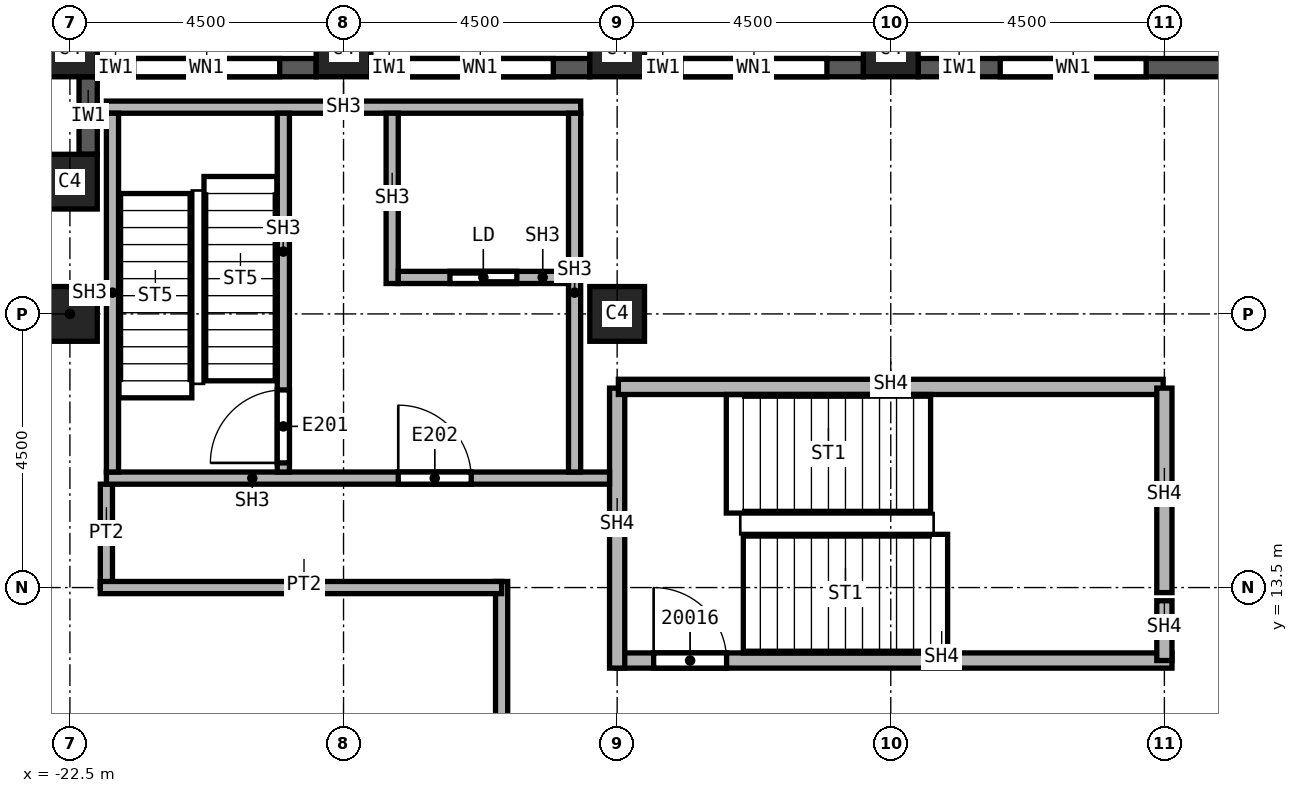
"""IFC4 building model, lengths in metres.
Left out: names, types, materials, properties, quantities, classifications, styles, units other than length and angle.
Written with IfcOpenShell. Run it as: python <this file> out.ifc"""

import sys

from ifc_helpers import new_model, si_unit, direction, frame, frame_2d, origin, origin_2d, place, context, subcontext, project, spatial, rectangle, extrude, element, fill, save


model = new_model("IFC4")
c1 = context("Model", 3, precision=1e-05, world=origin(), true_north=direction((0.0, 1.0)))
c2 = subcontext(c1, "Body", "Model", "MODEL_VIEW")
j1 = project(units=[si_unit("LENGTHUNIT", "METRE"), si_unit("PLANEANGLEUNIT", "RADIAN")], contexts=[c1])
p1 = place(None, origin())
s1 = spatial("IfcSite", under=j1, at=p1, CompositionType="ELEMENT")
p2 = place(p1, origin())
s2 = spatial("IfcBuilding", under=s1, at=p2, CompositionType="ELEMENT")
p3 = place(p2, frame((0.0, 0.0, 290.0)))
s3 = spatial("IfcBuildingStorey", under=s2, at=p3, CompositionType="ELEMENT", Elevation=290.0)
for number, where, z_axis, x_axis in (
    (1, (-13.5, 18.0, 0.0), (0.0, 0.0, 1.0), (1.0, 0.0, 0.0)),
    (2, (-22.5, 18.0, 0.0), (0.0, 0.0, 1.0), (1.0, 0.0, 0.0)),
    (3, (-9.0, 22.35, 0.0), (0.0, 0.0, 1.0), (1.0, 0.0, 0.0)),
    (4, (-13.5, 22.35, 0.0), (0.0, 0.0, 1.0), (1.0, 0.0, 0.0)),
    (5, (-18.0, 22.35, 0.0), (0.0, 0.0, 1.0), (1.0, 0.0, 0.0)),
    (6, (-22.5, 22.35, 0.0), (0.0, 0.0, 1.0), (1.0, 0.0, 0.0)),
    (7, (-22.5, 20.175, 0.0), (0.0, 0.0, 1.0), (1.0, 0.0, 0.0)),
):
    element("IfcColumn", number, at=place(p3, frame(where, z_axis=z_axis, x_axis=x_axis)), inside=s3, PredefinedType="COLUMN", context=c2, shape_type="SweptSolid", body=[
        extrude(rectangle(XDim=0.9, YDim=0.9, at=origin_2d()), origin(), (0.0, 0.0, 1.0), 3.59),
    ])
p4 = place(p3, frame((-3.45, 22.05, 0.0), z_axis=(0.0, 0.0, 1.0), x_axis=(-1.0, 0.0, 0.0)))
e8 = element("IfcWall", 8, at=p4, inside=s3, PredefinedType="SOLIDWALL", context=c2, shape_type="SweptSolid", body=[
    extrude(rectangle(XDim=5.1, YDim=0.3, at=frame_2d((2.55, 0.0))), origin(), (0.0, 0.0, 1.0), 2.99),
])
p5 = place(p4, frame((1.35, 0.0, 0.8)))
e9 = element("IfcOpeningElement", 9, at=p5, cuts=e8, PredefinedType="OPENING", context=c2, shape_type="SweptSolid", body=[
    extrude(rectangle(XDim=2.4, YDim=1.95, at=frame_2d((1.2, 0.975))), frame((0.0, 0.15, 0.0), z_axis=(0.0, -1.0, 0.0), x_axis=(1.0, 0.0, 0.0)), (0.0, 0.0, 1.0), 0.3),
])
p6 = place(p3, frame((-9.45, 22.05, 0.0), z_axis=(0.0, 0.0, 1.0), x_axis=(-1.0, 0.0, 0.0)))
e10 = element("IfcWall", 10, at=p6, inside=s3, PredefinedType="SOLIDWALL", context=c2, shape_type="SweptSolid", body=[
    extrude(rectangle(XDim=3.6, YDim=0.3, at=frame_2d((1.8, 0.0))), origin(), (0.0, 0.0, 1.0), 2.99),
])
p7 = place(p6, frame((0.6, 0.0, 0.8)))
e11 = element("IfcOpeningElement", 11, at=p7, cuts=e10, PredefinedType="OPENING", context=c2, shape_type="SweptSolid", body=[
    extrude(rectangle(XDim=2.4, YDim=1.95, at=frame_2d((1.2, 0.975))), frame((0.0, 0.15, 0.0), z_axis=(0.0, -1.0, 0.0), x_axis=(1.0, 0.0, 0.0)), (0.0, 0.0, 1.0), 0.3),
])
p8 = place(p3, frame((-13.95, 22.05, 0.0), z_axis=(0.0, 0.0, 1.0), x_axis=(-1.0, 0.0, 0.0)))
e12 = element("IfcWall", 12, at=p8, inside=s3, PredefinedType="SOLIDWALL", context=c2, shape_type="SweptSolid", body=[
    extrude(rectangle(XDim=3.6, YDim=0.3, at=frame_2d((1.8, 0.0))), origin(), (0.0, 0.0, 1.0), 2.99),
])
p9 = place(p8, frame((0.6, 0.0, 0.8)))
e13 = element("IfcOpeningElement", 13, at=p9, cuts=e12, PredefinedType="OPENING", context=c2, shape_type="SweptSolid", body=[
    extrude(rectangle(XDim=2.4, YDim=1.95, at=frame_2d((1.2, 0.975))), frame((0.0, 0.15, 0.0), z_axis=(0.0, -1.0, 0.0), x_axis=(1.0, 0.0, 0.0)), (0.0, 0.0, 1.0), 0.3),
])
p10 = place(p3, frame((-18.45, 22.05, 0.0), z_axis=(0.0, 0.0, 1.0), x_axis=(-1.0, 0.0, 0.0)))
e14 = element("IfcWall", 14, at=p10, inside=s3, PredefinedType="SOLIDWALL", context=c2, shape_type="SweptSolid", body=[
    extrude(rectangle(XDim=3.6, YDim=0.3, at=frame_2d((1.8, 0.0))), origin(), (0.0, 0.0, 1.0), 2.99),
])
p11 = place(p10, frame((0.6, 0.0, 0.8)))
e15 = element("IfcOpeningElement", 15, at=p11, cuts=e14, PredefinedType="OPENING", context=c2, shape_type="SweptSolid", body=[
    extrude(rectangle(XDim=2.4, YDim=1.95, at=frame_2d((1.2, 0.975))), frame((0.0, 0.15, 0.0), z_axis=(0.0, -1.0, 0.0), x_axis=(1.0, 0.0, 0.0)), (0.0, 0.0, 1.0), 0.3),
])
p12 = place(p3, frame((-22.2, 21.9, 0.0), z_axis=(0.0, 0.0, 1.0), x_axis=(0.0, -1.0, 0.0)))
e16 = element("IfcWall", 16, at=p12, inside=s3, PredefinedType="SOLIDWALL", context=c2, shape_type="SweptSolid", body=[
    extrude(rectangle(XDim=1.275, YDim=0.3, at=frame_2d((0.637, 0.0))), origin(), (0.0, 0.0, 1.0), 2.99),
])
p13 = place(p3, frame((-21.9, 13.5, 0.0), z_axis=(0.0, 0.0, 1.0), x_axis=(0.0, 1.0, 0.0)))
e17 = element("IfcWall", 17, at=p13, inside=s3, PredefinedType="PARTITIONING", context=c2, shape_type="SweptSolid", body=[
    extrude(rectangle(XDim=1.7, YDim=0.2, at=frame_2d((0.85, 0.0))), origin(), (0.0, 0.0, 1.0), 3.59),
])
p14 = place(p3, frame((-15.4, -21.9, 0.0), z_axis=(0.0, 0.0, 1.0), x_axis=(0.0, 1.0, 0.0)))
e18 = element("IfcWall", 18, at=p14, inside=s3, PredefinedType="PARTITIONING", context=c2, shape_type="SweptSolid", body=[
    extrude(rectangle(XDim=35.5, YDim=0.2, at=frame_2d((17.75, 0.0))), origin(), (0.0, 0.0, 1.0), 3.59),
])
p15 = place(p14, frame((30.9, 0.0, 0.0)))
e19 = element("IfcOpeningElement", 19, at=p15, cuts=e18, PredefinedType="OPENING", context=c2, shape_type="SweptSolid", body=[
    extrude(rectangle(XDim=1.0, YDim=2.1, at=frame_2d((0.5, 1.05))), frame((0.0, 0.1, 0.0), z_axis=(0.0, -1.0, 0.0), x_axis=(1.0, 0.0, 0.0)), (0.0, 0.0, 1.0), 0.2),
])
p16 = place(p14, frame((2.65, 0.0, 0.0)))
e20 = element("IfcOpeningElement", 20, at=p16, cuts=e18, PredefinedType="OPENING", context=c2, shape_type="SweptSolid", body=[
    extrude(rectangle(XDim=1.0, YDim=2.1, at=frame_2d((0.5, 1.05))), frame((0.0, 0.1, 0.0), z_axis=(0.0, -1.0, 0.0), x_axis=(1.0, 0.0, 0.0)), (0.0, 0.0, 1.0), 0.2),
])
p17 = place(p14, frame((7.65, 0.0, 0.0)))
e21 = element("IfcOpeningElement", 21, at=p17, cuts=e18, PredefinedType="OPENING", context=c2, shape_type="SweptSolid", body=[
    extrude(rectangle(XDim=1.0, YDim=2.1, at=frame_2d((0.5, 1.05))), frame((0.0, 0.1, 0.0), z_axis=(0.0, -1.0, 0.0), x_axis=(1.0, 0.0, 0.0)), (0.0, 0.0, 1.0), 0.2),
])
p18 = place(p14, frame((14.7, 0.0, 0.0)))
e22 = element("IfcOpeningElement", 22, at=p18, cuts=e18, PredefinedType="OPENING", context=c2, shape_type="SweptSolid", body=[
    extrude(rectangle(XDim=1.0, YDim=2.1, at=frame_2d((0.5, 1.05))), frame((0.0, 0.1, 0.0), z_axis=(0.0, -1.0, 0.0), x_axis=(1.0, 0.0, 0.0)), (0.0, 0.0, 1.0), 0.2),
])
p19 = place(p14, frame((18.3, 0.0, 0.0)))
e23 = element("IfcOpeningElement", 23, at=p19, cuts=e18, PredefinedType="OPENING", context=c2, shape_type="SweptSolid", body=[
    extrude(rectangle(XDim=1.0, YDim=2.1, at=frame_2d((0.5, 1.05))), frame((0.0, 0.1, 0.0), z_axis=(0.0, -1.0, 0.0), x_axis=(1.0, 0.0, 0.0)), (0.0, 0.0, 1.0), 0.2),
])
p20 = place(p3, frame((-15.4, 13.5, 0.0), z_axis=(0.0, 0.0, 1.0), x_axis=(-1.0, 0.0, 0.0)))
e24 = element("IfcWall", 24, at=p20, inside=s3, PredefinedType="PARTITIONING", context=c2, shape_type="SweptSolid", body=[
    extrude(rectangle(XDim=6.6, YDim=0.2, at=frame_2d((3.3, 0.0))), origin(), (0.0, 0.0, 1.0), 3.59),
])
p21 = place(p3, frame((-13.5, 12.3, 0.0), z_axis=(0.0, 0.0, 1.0), x_axis=(1.0, 0.0, 0.0)))
e25 = element("IfcWall", 25, at=p21, inside=s3, PredefinedType="SOLIDWALL", context=c2, shape_type="SweptSolid", body=[
    extrude(rectangle(XDim=9.125, YDim=0.25, at=frame_2d((4.562, 0.0))), origin(), (0.0, 0.0, 1.0), 3.59),
])
p22 = place(p21, frame((0.6, 0.0, 0.0)))
e26 = element("IfcOpeningElement", 26, at=p22, cuts=e25, PredefinedType="OPENING", context=c2, shape_type="SweptSolid", body=[
    extrude(rectangle(XDim=1.2, YDim=2.1, at=frame_2d((0.6, 1.05))), frame((0.0, 0.125, 0.0), z_axis=(0.0, -1.0, 0.0), x_axis=(1.0, 0.0, 0.0)), (0.0, 0.0, 1.0), 0.25),
])
p23 = place(p3, frame((-13.5, 16.78, 0.0), z_axis=(0.0, 0.0, 1.0), x_axis=(0.0, -1.0, 0.0)))
e27 = element("IfcWall", 27, at=p23, inside=s3, PredefinedType="SOLIDWALL", context=c2, shape_type="SweptSolid", body=[
    extrude(rectangle(XDim=4.605, YDim=0.25, at=frame_2d((2.302, 0.0))), origin(), (0.0, 0.0, 1.0), 3.59),
])
p24 = place(p3, frame((-13.48, 16.8, 0.0), z_axis=(0.0, 0.0, 1.0), x_axis=(1.0, 0.0, 0.0)))
e28 = element("IfcWall", 28, at=p24, inside=s3, PredefinedType="SOLIDWALL", context=c2, shape_type="SweptSolid", body=[
    extrude(rectangle(XDim=8.96, YDim=0.25, at=frame_2d((4.48, 0.0))), origin(), (0.0, 0.0, 1.0), 3.59),
])
p25 = place(p3, frame((-4.5, 13.283, 0.0), z_axis=(0.0, 0.0, 1.0), x_axis=(0.0, -1.0, 0.0)))
e29 = element("IfcWall", 29, at=p25, inside=s3, PredefinedType="SOLIDWALL", context=c2, shape_type="SweptSolid", body=[
    extrude(rectangle(XDim=0.983, YDim=0.25, at=frame_2d((0.491, 0.0))), origin(), (0.0, 0.0, 1.0), 3.59),
])
p26 = place(p3, frame((-4.5, 16.78, 0.0), z_axis=(0.0, 0.0, 1.0), x_axis=(0.0, -1.0, 0.0)))
e30 = element("IfcWall", 30, at=p26, inside=s3, PredefinedType="SOLIDWALL", context=c2, shape_type="SweptSolid", body=[
    extrude(rectangle(XDim=3.363, YDim=0.25, at=frame_2d((1.682, 0.0))), origin(), (0.0, 0.0, 1.0), 3.59),
])
p27 = place(p3, frame((-21.9, 15.3, 0.0), z_axis=(0.0, 0.0, 1.0), x_axis=(1.0, 0.0, 0.0)))
e31 = element("IfcWall", 31, at=p27, inside=s3, PredefinedType="SOLIDWALL", context=c2, shape_type="SweptSolid", body=[
    extrude(rectangle(XDim=8.275, YDim=0.2, at=frame_2d((4.137, 0.0))), origin(), (0.0, 0.0, 1.0), 3.59),
])
p28 = place(p27, frame((4.8, 0.0, 0.0)))
e32 = element("IfcOpeningElement", 32, at=p28, cuts=e31, PredefinedType="OPENING", context=c2, shape_type="SweptSolid", body=[
    extrude(rectangle(XDim=1.2, YDim=2.1, at=frame_2d((0.6, 1.05))), frame((0.0, 0.1, 0.0), z_axis=(0.0, -1.0, 0.0), x_axis=(1.0, 0.0, 0.0)), (0.0, 0.0, 1.0), 0.2),
])
p29 = place(p3, frame((-21.9, 21.4, 0.0), z_axis=(0.0, 0.0, 1.0), x_axis=(1.0, 0.0, 0.0)))
e33 = element("IfcWall", 33, at=p29, inside=s3, PredefinedType="SOLIDWALL", context=c2, shape_type="SweptSolid", body=[
    extrude(rectangle(XDim=7.8, YDim=0.2, at=frame_2d((3.9, 0.0))), origin(), (0.0, 0.0, 1.0), 3.59),
])
for number, where, z_axis, x_axis in (
    (34, (-21.8, 15.4, 0.0), (0.0, 0.0, 1.0), (0.0, 1.0, 0.0)),
    (35, (-14.2, 15.4, 0.0), (0.0, 0.0, 1.0), (0.0, 1.0, 0.0)),
):
    element("IfcWall", number, at=place(p3, frame(where, z_axis=z_axis, x_axis=x_axis)), inside=s3, PredefinedType="SOLIDWALL", context=c2, shape_type="SweptSolid", body=[
        extrude(rectangle(XDim=5.9, YDim=0.2, at=frame_2d((2.95, 0.0))), origin(), (0.0, 0.0, 1.0), 3.59),
    ])
p30 = place(p3, frame((-18.99, 15.4, 0.0), z_axis=(0.0, 0.0, 1.0), x_axis=(0.0, 1.0, 0.0)))
e36 = element("IfcWall", 36, at=p30, inside=s3, PredefinedType="SOLIDWALL", context=c2, shape_type="SweptSolid", body=[
    extrude(rectangle(XDim=5.9, YDim=0.2, at=frame_2d((2.95, 0.0))), origin(), (0.0, 0.0, 1.0), 3.59),
])
p31 = place(p30, frame((0.15, 0.0, 0.0)))
e37 = element("IfcOpeningElement", 37, at=p31, cuts=e36, PredefinedType="OPENING", context=c2, shape_type="SweptSolid", body=[
    extrude(rectangle(XDim=1.2, YDim=2.1, at=frame_2d((0.6, 1.05))), frame((0.0, 0.1, 0.0), z_axis=(0.0, -1.0, 0.0), x_axis=(1.0, 0.0, 0.0)), (0.0, 0.0, 1.0), 0.2),
])
p32 = place(p3, frame((-17.2, 18.5, 0.0), z_axis=(0.0, 0.0, 1.0), x_axis=(0.0, 1.0, 0.0)))
e38 = element("IfcWall", 38, at=p32, inside=s3, PredefinedType="SOLIDWALL", context=c2, shape_type="SweptSolid", body=[
    extrude(rectangle(XDim=2.8, YDim=0.2, at=frame_2d((1.4, 0.0))), origin(), (0.0, 0.0, 1.0), 3.59),
])
p33 = place(p3, frame((-17.1, 18.6, 0.0), z_axis=(0.0, 0.0, 1.0), x_axis=(1.0, 0.0, 0.0)))
e39 = element("IfcWall", 39, at=p33, inside=s3, PredefinedType="SOLIDWALL", context=c2, shape_type="SweptSolid", body=[
    extrude(rectangle(XDim=2.8, YDim=0.2, at=frame_2d((1.4, 0.0))), origin(), (0.0, 0.0, 1.0), 3.59),
])
p34 = place(p33, frame((0.85, 0.0, 0.0)))
e40 = element("IfcOpeningElement", 40, at=p34, cuts=e39, PredefinedType="OPENING", context=c2, shape_type="SweptSolid", body=[
    extrude(rectangle(XDim=1.1, YDim=2.1, at=frame_2d((0.55, 1.05))), frame((0.0, 0.1, 0.0), z_axis=(0.0, -1.0, 0.0), x_axis=(1.0, 0.0, 0.0)), (0.0, 0.0, 1.0), 0.2),
])
p35 = place(p5, origin())
e41 = element("IfcWindow", 41, at=p35, inside=s3, PartitioningType="SINGLE_PANEL", PredefinedType="WINDOW", context=c2, shape_type="SweptSolid", body=[
    extrude(rectangle(XDim=2.4, YDim=1.95, at=frame_2d((1.2, 0.975))), frame((0.0, 0.03, 0.0), z_axis=(0.0, -1.0, 0.0), x_axis=(1.0, 0.0, 0.0)), (0.0, 0.0, 1.0), 0.06),
])
fill(e9, e41)
p36 = place(p7, origin())
e42 = element("IfcWindow", 42, at=p36, inside=s3, PartitioningType="SINGLE_PANEL", PredefinedType="WINDOW", context=c2, shape_type="SweptSolid", body=[
    extrude(rectangle(XDim=2.4, YDim=1.95, at=frame_2d((1.2, 0.975))), frame((0.0, 0.03, 0.0), z_axis=(0.0, -1.0, 0.0), x_axis=(1.0, 0.0, 0.0)), (0.0, 0.0, 1.0), 0.06),
])
fill(e11, e42)
p37 = place(p9, origin())
e43 = element("IfcWindow", 43, at=p37, inside=s3, PartitioningType="SINGLE_PANEL", PredefinedType="WINDOW", context=c2, shape_type="SweptSolid", body=[
    extrude(rectangle(XDim=2.4, YDim=1.95, at=frame_2d((1.2, 0.975))), frame((0.0, 0.03, 0.0), z_axis=(0.0, -1.0, 0.0), x_axis=(1.0, 0.0, 0.0)), (0.0, 0.0, 1.0), 0.06),
])
fill(e13, e43)
p38 = place(p11, origin())
e44 = element("IfcWindow", 44, at=p38, inside=s3, PartitioningType="SINGLE_PANEL", PredefinedType="WINDOW", context=c2, shape_type="SweptSolid", body=[
    extrude(rectangle(XDim=2.4, YDim=1.95, at=frame_2d((1.2, 0.975))), frame((0.0, 0.03, 0.0), z_axis=(0.0, -1.0, 0.0), x_axis=(1.0, 0.0, 0.0)), (0.0, 0.0, 1.0), 0.06),
])
fill(e15, e44)
p39 = place(p22, origin())
e45 = element("IfcDoor", 45, at=p39, inside=s3, OperationType="SINGLE_SWING_LEFT", PredefinedType="DOOR", context=c2, shape_type="SweptSolid", body=[
    extrude(rectangle(XDim=1.2, YDim=2.1, at=frame_2d((0.6, 1.05))), frame((0.0, 0.025, 0.0), z_axis=(0.0, -1.0, 0.0), x_axis=(1.0, 0.0, 0.0)), (0.0, 0.0, 1.0), 0.05),
])
fill(e26, e45)
p40 = place(p31, origin())
e46 = element("IfcDoor", 46, at=p40, inside=s3, OperationType="SINGLE_SWING_LEFT", PredefinedType="DOOR", context=c2, shape_type="SweptSolid", body=[
    extrude(rectangle(XDim=1.2, YDim=2.1, at=frame_2d((0.6, 1.05))), frame((0.0, 0.025, 0.0), z_axis=(0.0, -1.0, 0.0), x_axis=(1.0, 0.0, 0.0)), (0.0, 0.0, 1.0), 0.05),
])
fill(e37, e46)
p41 = place(p34, origin())
e47 = element("IfcDoor", 47, at=p41, inside=s3, OperationType="SLIDING_TO_LEFT", PredefinedType="DOOR", context=c2, shape_type="SweptSolid", body=[
    extrude(rectangle(XDim=1.1, YDim=2.1, at=frame_2d((0.55, 1.05))), frame((0.0, 0.025, 0.0), z_axis=(0.0, -1.0, 0.0), x_axis=(1.0, 0.0, 0.0)), (0.0, 0.0, 1.0), 0.05),
])
fill(e40, e47)
p42 = place(p28, origin())
e48 = element("IfcDoor", 48, at=p42, inside=s3, OperationType="SINGLE_SWING_RIGHT", PredefinedType="DOOR", context=c2, shape_type="SweptSolid", body=[
    extrude(rectangle(XDim=1.2, YDim=2.1, at=frame_2d((0.6, 1.05))), frame((0.0, 0.025, 0.0), z_axis=(0.0, -1.0, 0.0), x_axis=(1.0, 0.0, 0.0)), (0.0, 0.0, 1.0), 0.05),
])
fill(e32, e48)
save(model, sys.argv[1])
